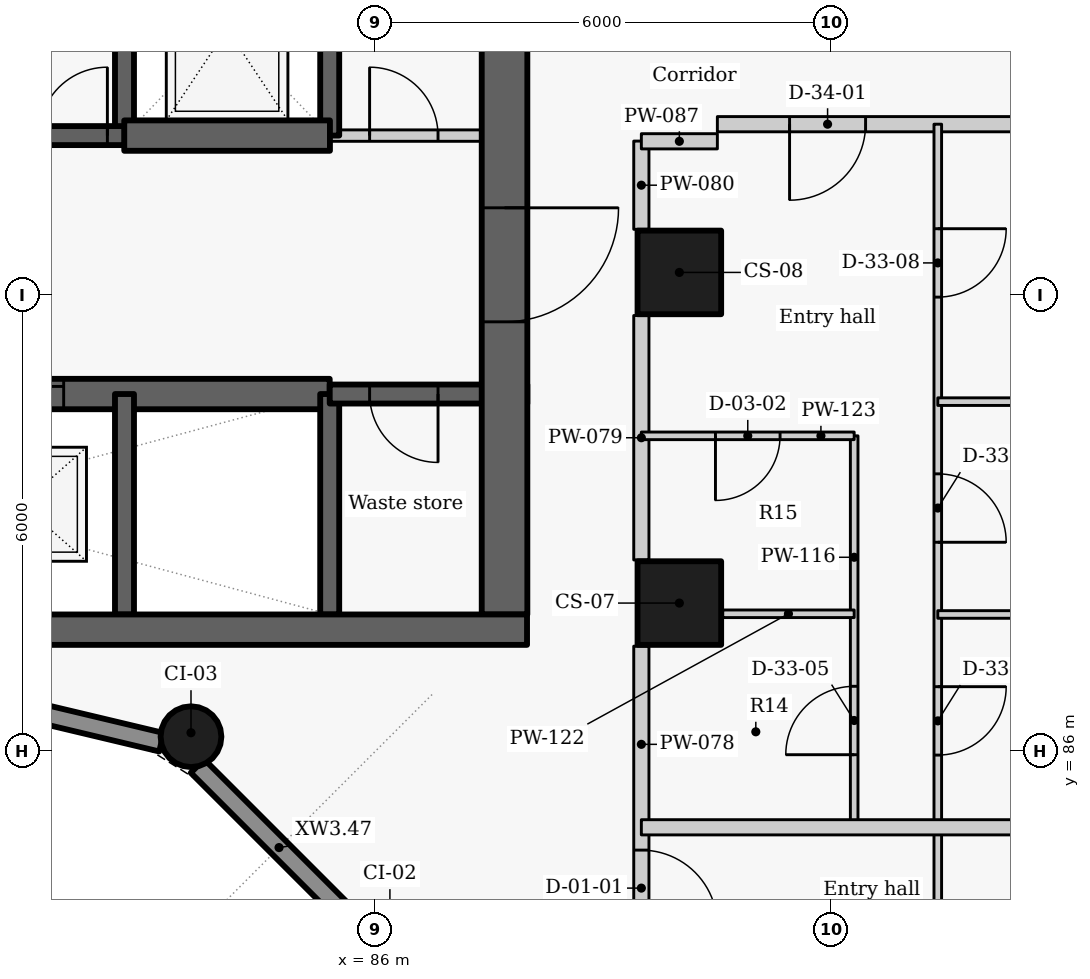
"""IFC4 building model, lengths in metres.
Left out: names, types, materials, properties, quantities, classifications, styles, units other than length and angle.
Written with IfcOpenShell. Run it as: python <this file> out.ifc"""

import sys

from ifc_helpers import new_model, si_unit, direction, frame, frame_2d, origin, origin_2d, place, context, subcontext, project, spatial, rectangle, circle, extrude, element, fill, save


model = new_model("IFC4")
c1 = context("Model", 3, precision=1e-05, world=origin(), true_north=direction((0.0, 1.0)))
c2 = subcontext(c1, "Body", "Model", "MODEL_VIEW")
j1 = project(units=[si_unit("LENGTHUNIT", "METRE"), si_unit("PLANEANGLEUNIT", "RADIAN")], contexts=[c1])
p1 = place(None, origin())
s1 = spatial("IfcSite", under=j1, at=p1, CompositionType="ELEMENT")
p2 = place(p1, origin())
s2 = spatial("IfcBuilding", under=s1, at=p2, CompositionType="ELEMENT")
p3 = place(p2, frame((0.0, 0.0, 67.8)))
s3 = spatial("IfcBuildingStorey", under=s2, at=p3, CompositionType="ELEMENT", Elevation=67.8)
for number, where, z_axis, x_axis in (
    (1, (90.0, 87.95, 0.0), (0.0, 0.0, 1.0), (0.0, 1.0, 0.0)),
    (2, (90.0, 92.3, 0.0), (0.0, 0.0, 1.0), (0.0, 1.0, 0.0)),
):
    element("IfcColumn", number, at=place(p3, frame(where, z_axis=z_axis, x_axis=x_axis)), inside=s3, PredefinedType="COLUMN", context=c2, shape_type="SweptSolid", body=[
        extrude(rectangle(XDim=1.1, YDim=1.1, at=origin_2d()), origin(), (0.0, 0.0, 1.0), 3.3),
    ])
p4 = place(p3, frame((83.575, 86.192, 0.0), z_axis=(0.0, 0.0, 1.0), x_axis=(-0.866025403784, 0.5, 0.0)))
e3 = element("IfcColumn", 3, at=p4, inside=s3, PredefinedType="COLUMN", context=c2, shape_type="SweptSolid", body=[
    extrude(circle(Radius=0.4, at=origin_2d()), origin(), (0.0, 0.0, 1.0), 3.3),
])
p5 = place(p3, frame((80.029, 86.872, 0.0), z_axis=(0.0, 0.0, 1.0), x_axis=(0.972773113459, -0.231759508395, 0.0)))
e4 = element("IfcWall", 4, at=p5, inside=s3, PredefinedType="SOLIDWALL", context=c2, shape_type="SweptSolid", body=[
    extrude(rectangle(XDim=3.246, YDim=0.25, at=frame_2d((1.623, 0.0))), origin(), (0.0, 0.0, 1.0), 2.05),
])
p6 = place(p3, frame((83.661, 85.806, 0.0), z_axis=(0.0, 0.0, 1.0), x_axis=(0.707106781187, -0.707106781187, 0.0)))
e5 = element("IfcWall", 5, at=p6, inside=s3, PredefinedType="SOLIDWALL", context=c2, shape_type="SweptSolid", body=[
    extrude(rectangle(XDim=3.033, YDim=0.25, at=frame_2d((1.517, 0.0))), origin(), (0.0, 0.0, 1.0), 2.05),
])
p7 = place(p3, frame((74.6, 90.7, -0.275), z_axis=(0.0, 0.0, 1.0), x_axis=(1.0, 0.0, 0.0)))
e6 = element("IfcWall", 6, at=p7, inside=s3, PredefinedType="SHEAR", context=c2, shape_type="SweptSolid", body=[
    extrude(rectangle(XDim=10.8, YDim=0.4, at=frame_2d((5.4, 0.0))), origin(), (0.0, 0.0, 1.0), 3.225),
])
p8 = place(p7, frame((0.8, 0.0, 0.275)))
e7 = element("IfcOpeningElement", 7, at=p8, cuts=e6, PredefinedType="OPENING", context=c2, shape_type="SweptSolid", body=[
    extrude(rectangle(XDim=1.1, YDim=2.1, at=frame_2d((0.55, 1.05))), frame((0.0, 0.21, 0.0), z_axis=(0.0, -1.0, 0.0), x_axis=(1.0, 0.0, 0.0)), (0.0, 0.0, 1.0), 0.42),
])
p9 = place(p7, frame((3.5, 0.0, 0.275)))
e8 = element("IfcOpeningElement", 8, at=p9, cuts=e6, PredefinedType="OPENING", context=c2, shape_type="SweptSolid", body=[
    extrude(rectangle(XDim=1.1, YDim=2.1, at=frame_2d((0.55, 1.05))), frame((0.0, 0.21, 0.0), z_axis=(0.0, -1.0, 0.0), x_axis=(1.0, 0.0, 0.0)), (0.0, 0.0, 1.0), 0.42),
])
p10 = place(p7, frame((6.2, 0.0, 0.275)))
e9 = element("IfcOpeningElement", 9, at=p10, cuts=e6, PredefinedType="OPENING", context=c2, shape_type="SweptSolid", body=[
    extrude(rectangle(XDim=1.1, YDim=2.1, at=frame_2d((0.55, 1.05))), frame((0.0, 0.21, 0.0), z_axis=(0.0, -1.0, 0.0), x_axis=(1.0, 0.0, 0.0)), (0.0, 0.0, 1.0), 0.42),
])
p11 = place(p3, frame((82.7, 87.8, -0.275), z_axis=(0.0, 0.0, 1.0), x_axis=(0.0, 1.0, 0.0)))
e10 = element("IfcWall", 10, at=p11, inside=s3, PredefinedType="SHEAR", context=c2, shape_type="SweptSolid", body=[
    extrude(rectangle(XDim=2.9, YDim=0.25, at=frame_2d((1.45, 0.0))), origin(), (0.0, 0.0, 1.0), 3.225),
])
p12 = place(p3, frame((82.7, 94.1, -0.275), z_axis=(0.0, 0.0, 1.0), x_axis=(0.0, 1.0, 0.0)))
e11 = element("IfcWall", 11, at=p12, inside=s3, PredefinedType="SHEAR", context=c2, shape_type="SweptSolid", body=[
    extrude(rectangle(XDim=2.8, YDim=0.25, at=frame_2d((1.4, 0.0))), origin(), (0.0, 0.0, 1.0), 3.225),
])
p13 = place(p3, frame((85.4, 87.8, -0.275), z_axis=(0.0, 0.0, 1.0), x_axis=(0.0, 1.0, 0.0)))
e12 = element("IfcWall", 12, at=p13, inside=s3, PredefinedType="SHEAR", context=c2, shape_type="SweptSolid", body=[
    extrude(rectangle(XDim=2.9, YDim=0.25, at=frame_2d((1.45, 0.0))), origin(), (0.0, 0.0, 1.0), 3.225),
])
p14 = place(p3, frame((85.4, 94.1, -0.275), z_axis=(0.0, 0.0, 1.0), x_axis=(0.0, 1.0, 0.0)))
e13 = element("IfcWall", 13, at=p14, inside=s3, PredefinedType="SHEAR", context=c2, shape_type="SweptSolid", body=[
    extrude(rectangle(XDim=2.8, YDim=0.25, at=frame_2d((1.4, 0.0))), origin(), (0.0, 0.0, 1.0), 3.225),
])
p15 = place(p3, frame((88.0, 90.7, -0.275), z_axis=(0.0, 0.0, 1.0), x_axis=(-1.0, 0.0, 0.0)))
e14 = element("IfcWall", 14, at=p15, inside=s3, PredefinedType="SHEAR", context=c2, shape_type="SweptSolid", body=[
    extrude(rectangle(XDim=2.6, YDim=0.25, at=frame_2d((1.3, 0.0))), origin(), (0.0, 0.0, 1.0), 3.225),
])
p16 = place(p15, frame((1.175, 0.0, 0.275)))
e15 = element("IfcOpeningElement", 15, at=p16, cuts=e14, PredefinedType="OPENING", context=c2, shape_type="SweptSolid", body=[
    extrude(rectangle(XDim=0.9, YDim=2.1, at=frame_2d((0.45, 1.05))), frame((0.0, 0.135, 0.0), z_axis=(0.0, -1.0, 0.0), x_axis=(1.0, 0.0, 0.0)), (0.0, 0.0, 1.0), 0.27),
])
p17 = place(p3, frame((87.7, 103.4, -0.275), z_axis=(0.0, 0.0, 1.0), x_axis=(0.0, -1.0, 0.0)))
e16 = element("IfcWall", 16, at=p17, inside=s3, PredefinedType="SHEAR", context=c2, shape_type="SweptSolid", body=[
    extrude(rectangle(XDim=15.6, YDim=0.6, at=frame_2d((7.8, 0.0))), origin(), (0.0, 0.0, 1.0), 3.225),
])
p18 = place(p17, frame((10.25, 0.0, 0.275)))
e17 = element("IfcOpeningElement", 17, at=p18, cuts=e16, PredefinedType="OPENING", context=c2, shape_type="SweptSolid", body=[
    extrude(rectangle(XDim=1.5, YDim=2.1, at=frame_2d((0.75, 1.05))), frame((0.0, 0.31, 0.0), z_axis=(0.0, -1.0, 0.0), x_axis=(1.0, 0.0, 0.0)), (0.0, 0.0, 1.0), 0.62),
])
p19 = place(p17, frame((2.7, 0.0, 0.275)))
e18 = element("IfcOpeningElement", 18, at=p19, cuts=e16, PredefinedType="OPENING", context=c2, shape_type="SweptSolid", body=[
    extrude(rectangle(XDim=1.1, YDim=2.1, at=frame_2d((0.55, 1.05))), frame((0.0, 0.31, 0.0), z_axis=(0.0, -1.0, 0.0), x_axis=(1.0, 0.0, 0.0)), (0.0, 0.0, 1.0), 0.62),
])
p20 = place(p3, frame((85.397, 94.1, 0.0), z_axis=(0.0, 0.0, 1.0), x_axis=(1.0, 0.0, 0.0)))
e19 = element("IfcWall", 19, at=p20, inside=s3, PredefinedType="PARTITIONING", context=c2, shape_type="SweptSolid", body=[
    extrude(rectangle(XDim=2.603, YDim=0.15, at=frame_2d((1.302, 0.0))), origin(), (0.0, 0.0, 1.0), 2.95),
])
p21 = place(p20, frame((0.528, 0.0, 0.0)))
e20 = element("IfcOpeningElement", 20, at=p21, cuts=e19, PredefinedType="OPENING", context=c2, shape_type="SweptSolid", body=[
    extrude(rectangle(XDim=0.9, YDim=2.1, at=frame_2d((0.45, 1.05))), frame((0.0, 0.085, 0.0), z_axis=(0.0, -1.0, 0.0), x_axis=(1.0, 0.0, 0.0)), (0.0, 0.0, 1.0), 0.17),
])
p22 = place(p3, frame((79.997, 94.1, -0.275), z_axis=(0.0, 0.0, 1.0), x_axis=(1.0, 0.0, 0.0)))
e21 = element("IfcWall", 21, at=p22, inside=s3, PredefinedType="SHEAR", context=c2, shape_type="SweptSolid", body=[
    extrude(rectangle(XDim=2.706, YDim=0.25, at=frame_2d((1.353, 0.0))), origin(), (0.0, 0.0, 1.0), 3.225),
])
p23 = place(p22, frame((0.228, 0.0, 0.275)))
e22 = element("IfcOpeningElement", 22, at=p23, cuts=e21, PredefinedType="OPENING", context=c2, shape_type="SweptSolid", body=[
    extrude(rectangle(XDim=0.9, YDim=2.1, at=frame_2d((0.45, 1.05))), frame((0.0, 0.135, 0.0), z_axis=(0.0, -1.0, 0.0), x_axis=(1.0, 0.0, 0.0)), (0.0, 0.0, 1.0), 0.27),
])
p24 = place(p22, frame((1.578, 0.0, 0.275)))
e23 = element("IfcOpeningElement", 23, at=p24, cuts=e21, PredefinedType="OPENING", context=c2, shape_type="SweptSolid", body=[
    extrude(rectangle(XDim=0.9, YDim=2.1, at=frame_2d((0.45, 1.05))), frame((0.0, 0.135, 0.0), z_axis=(0.0, -1.0, 0.0), x_axis=(1.0, 0.0, 0.0)), (0.0, 0.0, 1.0), 0.27),
])
p25 = place(p3, frame((82.697, 94.1, -0.275), z_axis=(0.0, 0.0, 1.0), x_axis=(1.0, 0.0, 0.0)))
e24 = element("IfcWall", 24, at=p25, inside=s3, PredefinedType="SHEAR", context=c2, shape_type="SweptSolid", body=[
    extrude(rectangle(XDim=2.706, YDim=0.4, at=frame_2d((1.353, 0.0))), origin(), (0.0, 0.0, 1.0), 3.225),
])
p26 = place(p3, frame((89.5, 87.383, 0.0), z_axis=(0.0, 0.0, 1.0), x_axis=(0.0, -1.0, 0.0)))
e25 = element("IfcWall", 25, at=p26, inside=s3, PredefinedType="PARTITIONING", context=c2, shape_type="SweptSolid", body=[
    extrude(rectangle(XDim=3.986, YDim=0.2, at=frame_2d((1.993, 0.0))), origin(), (0.0, 0.0, 1.0), 2.95),
])
p27 = place(p26, frame((2.683, 0.0, 0.0)))
e26 = element("IfcOpeningElement", 26, at=p27, cuts=e25, PredefinedType="OPENING", context=c2, shape_type="SweptSolid", body=[
    extrude(rectangle(XDim=1.0, YDim=2.1, at=frame_2d((0.5, 1.05))), frame((0.0, 0.11, 0.0), z_axis=(0.0, -1.0, 0.0), x_axis=(1.0, 0.0, 0.0)), (0.0, 0.0, 1.0), 0.22),
])
p28 = place(p3, frame((89.5, 88.517, 0.0), z_axis=(0.0, 0.0, 1.0), x_axis=(0.0, 1.0, 0.0)))
e27 = element("IfcWall", 27, at=p28, inside=s3, PredefinedType="PARTITIONING", context=c2, shape_type="SweptSolid", body=[
    extrude(rectangle(XDim=3.216, YDim=0.2, at=frame_2d((1.608, 0.0))), origin(), (0.0, 0.0, 1.0), 2.95),
])
p29 = place(p3, frame((89.5, 92.867, 0.0), z_axis=(0.0, 0.0, 1.0), x_axis=(0.0, 1.0, 0.0)))
e28 = element("IfcWall", 28, at=p29, inside=s3, PredefinedType="PARTITIONING", context=c2, shape_type="SweptSolid", body=[
    extrude(rectangle(XDim=1.161, YDim=0.2, at=frame_2d((0.581, 0.0))), origin(), (0.0, 0.0, 1.0), 2.95),
])
p30 = place(p3, frame((99.139, 94.25, 0.0), z_axis=(0.0, 0.0, 1.0), x_axis=(-1.0, 0.0, 0.0)))
e29 = element("IfcWall", 29, at=p30, inside=s3, PredefinedType="PARTITIONING", context=c2, shape_type="SweptSolid", body=[
    extrude(rectangle(XDim=8.639, YDim=0.2, at=frame_2d((4.32, 0.0))), origin(), (0.0, 0.0, 1.0), 2.03),
])
p31 = place(p30, frame((6.689, 0.0, 0.0)))
e30 = element("IfcOpeningElement", 30, at=p31, cuts=e29, PredefinedType="OPENING", context=c2, shape_type="SweptSolid", body=[
    extrude(rectangle(XDim=1.0, YDim=2.01, at=frame_2d((0.5, 1.005))), frame((0.0, 0.11, 0.0), z_axis=(0.0, -1.0, 0.0), x_axis=(1.0, 0.0, 0.0)), (0.0, 0.0, 1.0), 0.22),
])
p32 = place(p3, frame((89.5, 94.025, 0.0), z_axis=(0.0, 0.0, 1.0), x_axis=(1.0, 0.0, 0.0)))
e31 = element("IfcWall", 31, at=p32, inside=s3, PredefinedType="PARTITIONING", context=c2, shape_type="SweptSolid", body=[
    extrude(rectangle(XDim=1.0, YDim=0.2, at=frame_2d((0.5, 0.0))), origin(), (0.0, 0.0, 1.0), 2.43),
])
p33 = place(p3, frame((92.3, 85.0, 0.0), z_axis=(0.0, 0.0, 1.0), x_axis=(0.0, 1.0, 0.0)))
e32 = element("IfcWall", 32, at=p33, inside=s3, PredefinedType="PARTITIONING", context=c2, shape_type="SweptSolid", body=[
    extrude(rectangle(XDim=5.15, YDim=0.1, at=frame_2d((2.575, 0.0))), origin(), (0.0, 0.0, 1.0), 2.95),
])
p34 = place(p33, frame((0.955, 0.0, 0.0)))
e33 = element("IfcOpeningElement", 33, at=p34, cuts=e32, PredefinedType="OPENING", context=c2, shape_type="SweptSolid", body=[
    extrude(rectangle(XDim=0.9, YDim=2.1, at=frame_2d((0.45, 1.05))), frame((0.0, 0.06, 0.0), z_axis=(0.0, -1.0, 0.0), x_axis=(1.0, 0.0, 0.0)), (0.0, 0.0, 1.0), 0.12),
])
p35 = place(p3, frame((93.4, 94.25, 0.0), z_axis=(0.0, 0.0, 1.0), x_axis=(0.0, -1.0, 0.0)))
e34 = element("IfcWall", 34, at=p35, inside=s3, PredefinedType="PARTITIONING", context=c2, shape_type="SweptSolid", body=[
    extrude(rectangle(XDim=19.25, YDim=0.1, at=frame_2d((9.625, 0.0))), origin(), (0.0, 0.0, 1.0), 2.95),
])
p36 = place(p35, frame((17.348, 0.0, 0.0)))
e35 = element("IfcOpeningElement", 35, at=p36, cuts=e34, PredefinedType="OPENING", context=c2, shape_type="SweptSolid", body=[
    extrude(rectangle(XDim=0.9, YDim=2.1, at=frame_2d((0.45, 1.05))), frame((0.0, 0.06, 0.0), z_axis=(0.0, -1.0, 0.0), x_axis=(1.0, 0.0, 0.0)), (0.0, 0.0, 1.0), 0.12),
])
p37 = place(p35, frame((14.445, 0.0, 0.0)))
e36 = element("IfcOpeningElement", 36, at=p37, cuts=e34, PredefinedType="OPENING", context=c2, shape_type="SweptSolid", body=[
    extrude(rectangle(XDim=0.9, YDim=2.1, at=frame_2d((0.45, 1.05))), frame((0.0, 0.06, 0.0), z_axis=(0.0, -1.0, 0.0), x_axis=(1.0, 0.0, 0.0)), (0.0, 0.0, 1.0), 0.12),
])
p38 = place(p35, frame((10.897, 0.0, 0.0)))
e37 = element("IfcOpeningElement", 37, at=p38, cuts=e34, PredefinedType="OPENING", context=c2, shape_type="SweptSolid", body=[
    extrude(rectangle(XDim=0.9, YDim=2.1, at=frame_2d((0.45, 1.05))), frame((0.0, 0.06, 0.0), z_axis=(0.0, -1.0, 0.0), x_axis=(1.0, 0.0, 0.0)), (0.0, 0.0, 1.0), 0.12),
])
p39 = place(p35, frame((7.4, 0.0, 0.0)))
e38 = element("IfcOpeningElement", 38, at=p39, cuts=e34, PredefinedType="OPENING", context=c2, shape_type="SweptSolid", body=[
    extrude(rectangle(XDim=0.9, YDim=2.1, at=frame_2d((0.45, 1.05))), frame((0.0, 0.06, 0.0), z_axis=(0.0, -1.0, 0.0), x_axis=(1.0, 0.0, 0.0)), (0.0, 0.0, 1.0), 0.12),
])
p40 = place(p35, frame((4.6, 0.0, 0.0)))
e39 = element("IfcOpeningElement", 39, at=p40, cuts=e34, PredefinedType="OPENING", context=c2, shape_type="SweptSolid", body=[
    extrude(rectangle(XDim=0.9, YDim=2.1, at=frame_2d((0.45, 1.05))), frame((0.0, 0.06, 0.0), z_axis=(0.0, -1.0, 0.0), x_axis=(1.0, 0.0, 0.0)), (0.0, 0.0, 1.0), 0.12),
])
p41 = place(p35, frame((1.375, 0.0, 0.0)))
e40 = element("IfcOpeningElement", 40, at=p41, cuts=e34, PredefinedType="OPENING", context=c2, shape_type="SweptSolid", body=[
    extrude(rectangle(XDim=0.9, YDim=2.1, at=frame_2d((0.45, 1.05))), frame((0.0, 0.06, 0.0), z_axis=(0.0, -1.0, 0.0), x_axis=(1.0, 0.0, 0.0)), (0.0, 0.0, 1.0), 0.12),
])
p42 = place(p3, frame((89.5, 85.0, 0.0), z_axis=(0.0, 0.0, 1.0), x_axis=(1.0, 0.0, 0.0)))
e41 = element("IfcWall", 41, at=p42, inside=s3, PredefinedType="PARTITIONING", context=c2, shape_type="SweptSolid", body=[
    extrude(rectangle(XDim=14.979, YDim=0.2, at=frame_2d((7.49, 0.0))), origin(), (0.0, 0.0, 1.0), 2.03),
])
p43 = place(p3, frame((90.57, 87.809, 0.0), z_axis=(0.0, 0.0, 1.0), x_axis=(1.0, 0.0, 0.0)))
e42 = element("IfcWall", 42, at=p43, inside=s3, PredefinedType="PARTITIONING", context=c2, shape_type="SweptSolid", body=[
    extrude(rectangle(XDim=1.73, YDim=0.1, at=frame_2d((0.865, 0.0))), origin(), (0.0, 0.0, 1.0), 2.95),
])
p44 = place(p3, frame((92.3, 90.15, 0.0), z_axis=(0.0, 0.0, 1.0), x_axis=(-1.0, 0.0, 0.0)))
e43 = element("IfcWall", 43, at=p44, inside=s3, PredefinedType="PARTITIONING", context=c2, shape_type="SweptSolid", body=[
    extrude(rectangle(XDim=2.8, YDim=0.1, at=frame_2d((1.4, 0.0))), origin(), (0.0, 0.0, 1.0), 2.43),
])
p45 = place(p44, frame((0.975, 0.0, 0.0)))
e44 = element("IfcOpeningElement", 44, at=p45, cuts=e43, PredefinedType="OPENING", context=c2, shape_type="SweptSolid", body=[
    extrude(rectangle(XDim=0.85, YDim=2.1, at=frame_2d((0.425, 1.05))), frame((0.0, 0.06, 0.0), z_axis=(0.0, -1.0, 0.0), x_axis=(1.0, 0.0, 0.0)), (0.0, 0.0, 1.0), 0.12),
])
p46 = place(p3, frame((93.4, 87.8, 0.0), z_axis=(0.0, 0.0, 1.0), x_axis=(1.0, 0.0, 0.0)))
e45 = element("IfcWall", 45, at=p46, inside=s3, PredefinedType="PARTITIONING", context=c2, shape_type="SweptSolid", body=[
    extrude(rectangle(XDim=8.747, YDim=0.1, at=frame_2d((4.374, 0.0))), origin(), (0.0, 0.0, 1.0), 2.95),
])
p47 = place(p3, frame((93.4, 90.6, 0.0), z_axis=(0.0, 0.0, 1.0), x_axis=(1.0, 0.0, 0.0)))
e46 = element("IfcWall", 46, at=p47, inside=s3, PredefinedType="PARTITIONING", context=c2, shape_type="SweptSolid", body=[
    extrude(rectangle(XDim=7.846, YDim=0.1, at=frame_2d((3.923, 0.0))), origin(), (0.0, 0.0, 1.0), 2.03),
])
p48 = place(p3, frame((72.004, 87.6, -0.275), z_axis=(0.0, 0.0, 1.0), x_axis=(1.0, 0.0, 0.0)))
e47 = element("IfcWall", 47, at=p48, inside=s3, PredefinedType="SHEAR", context=c2, shape_type="SweptSolid", body=[
    extrude(rectangle(XDim=15.992, YDim=0.4, at=frame_2d((7.996, 0.0))), origin(), (0.0, 0.0, 1.0), 3.225),
])
p49 = place(p10, origin())
e48 = element("IfcDoor", 48, at=p49, inside=s3, OperationType="SLIDING_TO_LEFT", PredefinedType="DOOR", context=c2, shape_type="SweptSolid", body=[
    extrude(rectangle(XDim=1.1, YDim=2.1, at=frame_2d((0.55, 1.05))), frame((0.0, 0.025, 0.0), z_axis=(0.0, -1.0, 0.0), x_axis=(1.0, 0.0, 0.0)), (0.0, 0.0, 1.0), 0.05),
])
fill(e9, e48)
p50 = place(p16, origin())
e49 = element("IfcDoor", 49, at=p50, inside=s3, OperationType="SINGLE_SWING_LEFT", PredefinedType="DOOR", context=c2, shape_type="SweptSolid", body=[
    extrude(rectangle(XDim=0.9, YDim=2.1, at=frame_2d((0.45, 1.05))), frame((0.0, 0.025, 0.0), z_axis=(0.0, -1.0, 0.0), x_axis=(1.0, 0.0, 0.0)), (0.0, 0.0, 1.0), 0.05),
])
fill(e15, e49)
p51 = place(p24, origin())
e50 = element("IfcDoor", 50, at=p51, inside=s3, OperationType="SINGLE_SWING_RIGHT", PredefinedType="DOOR", context=c2, shape_type="SweptSolid", body=[
    extrude(rectangle(XDim=0.9, YDim=2.1, at=frame_2d((0.45, 1.05))), frame((0.0, 0.025, 0.0), z_axis=(0.0, -1.0, 0.0), x_axis=(1.0, 0.0, 0.0)), (0.0, 0.0, 1.0), 0.05),
])
fill(e23, e50)
p52 = place(p21, origin())
e51 = element("IfcDoor", 51, at=p52, inside=s3, OperationType="SINGLE_SWING_LEFT", PredefinedType="DOOR", context=c2, shape_type="SweptSolid", body=[
    extrude(rectangle(XDim=0.9, YDim=2.1, at=frame_2d((0.45, 1.05))), frame((0.0, 0.025, 0.0), z_axis=(0.0, -1.0, 0.0), x_axis=(1.0, 0.0, 0.0)), (0.0, 0.0, 1.0), 0.05),
])
fill(e20, e51)
p53 = place(p27, origin())
e52 = element("IfcDoor", 52, at=p53, inside=s3, OperationType="SINGLE_SWING_RIGHT", PredefinedType="DOOR", context=c2, shape_type="SweptSolid", body=[
    extrude(rectangle(XDim=1.0, YDim=2.1, at=frame_2d((0.5, 1.05))), frame((0.0, 0.025, 0.0), z_axis=(0.0, -1.0, 0.0), x_axis=(1.0, 0.0, 0.0)), (0.0, 0.0, 1.0), 0.05),
])
fill(e26, e52)
p54 = place(p31, origin())
e53 = element("IfcDoor", 53, at=p54, inside=s3, OperationType="SINGLE_SWING_RIGHT", PredefinedType="DOOR", context=c2, shape_type="SweptSolid", body=[
    extrude(rectangle(XDim=1.0, YDim=2.01, at=frame_2d((0.5, 1.005))), frame((0.0, 0.025, 0.0), z_axis=(0.0, -1.0, 0.0), x_axis=(1.0, 0.0, 0.0)), (0.0, 0.0, 1.0), 0.05),
])
fill(e30, e53)
p55 = place(p34, origin())
e54 = element("IfcDoor", 54, at=p55, inside=s3, OperationType="SINGLE_SWING_LEFT", PredefinedType="DOOR", context=c2, shape_type="SweptSolid", body=[
    extrude(rectangle(XDim=0.9, YDim=2.1, at=frame_2d((0.45, 1.05))), frame((0.0, 0.025, 0.0), z_axis=(0.0, -1.0, 0.0), x_axis=(1.0, 0.0, 0.0)), (0.0, 0.0, 1.0), 0.05),
])
fill(e33, e54)
p56 = place(p45, origin())
e55 = element("IfcDoor", 55, at=p56, inside=s3, OperationType="SINGLE_SWING_RIGHT", PredefinedType="DOOR", context=c2, shape_type="SweptSolid", body=[
    extrude(rectangle(XDim=0.85, YDim=2.1, at=frame_2d((0.425, 1.05))), frame((0.0, 0.025, 0.0), z_axis=(0.0, -1.0, 0.0), x_axis=(1.0, 0.0, 0.0)), (0.0, 0.0, 1.0), 0.05),
])
fill(e44, e55)
p57 = place(p39, origin())
e56 = element("IfcDoor", 56, at=p57, inside=s3, OperationType="SINGLE_SWING_LEFT", PredefinedType="DOOR", context=c2, shape_type="SweptSolid", body=[
    extrude(rectangle(XDim=0.9, YDim=2.1, at=frame_2d((0.45, 1.05))), frame((0.0, 0.025, 0.0), z_axis=(0.0, -1.0, 0.0), x_axis=(1.0, 0.0, 0.0)), (0.0, 0.0, 1.0), 0.05),
])
fill(e38, e56)
p58 = place(p40, origin())
e57 = element("IfcDoor", 57, at=p58, inside=s3, OperationType="SINGLE_SWING_RIGHT", PredefinedType="DOOR", context=c2, shape_type="SweptSolid", body=[
    extrude(rectangle(XDim=0.9, YDim=2.1, at=frame_2d((0.45, 1.05))), frame((0.0, 0.025, 0.0), z_axis=(0.0, -1.0, 0.0), x_axis=(1.0, 0.0, 0.0)), (0.0, 0.0, 1.0), 0.05),
])
fill(e39, e57)
p59 = place(p41, origin())
e58 = element("IfcDoor", 58, at=p59, inside=s3, OperationType="SINGLE_SWING_LEFT", PredefinedType="DOOR", context=c2, shape_type="SweptSolid", body=[
    extrude(rectangle(XDim=0.9, YDim=2.1, at=frame_2d((0.45, 1.05))), frame((0.0, 0.025, 0.0), z_axis=(0.0, -1.0, 0.0), x_axis=(1.0, 0.0, 0.0)), (0.0, 0.0, 1.0), 0.05),
])
fill(e40, e58)
p60 = place(p18, origin())
e59 = element("IfcDoor", 59, at=p60, inside=s3, OperationType="DOUBLE_DOOR_SINGLE_SWING", PredefinedType="DOOR", context=c2, shape_type="SweptSolid", body=[
    extrude(rectangle(XDim=1.5, YDim=2.1, at=frame_2d((0.75, 1.05))), frame((0.0, 0.025, 0.0), z_axis=(0.0, -1.0, 0.0), x_axis=(1.0, 0.0, 0.0)), (0.0, 0.0, 1.0), 0.05),
])
fill(e17, e59)
save(model, sys.argv[1])
